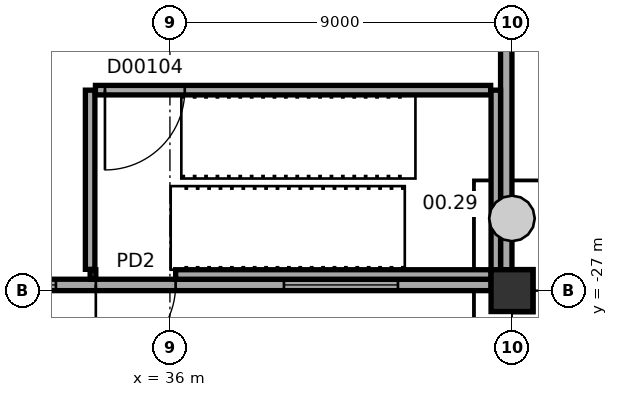
"""IFC4 building model, lengths in metres.
Left out: names, types, materials, properties, quantities, classifications, styles, units other than length and angle.
Written with IfcOpenShell. Run it as: python <this file> out.ifc"""

import sys

from ifc_helpers import new_model, si_unit, direction, frame, frame_2d, origin, origin_2d, place, context, subcontext, project, spatial, rectangle, extrude, element, fill, save


model = new_model("IFC4")
c1 = context("Model", 3, precision=1e-05, world=origin(), true_north=direction((0.0, 1.0)))
c2 = subcontext(c1, "Body", "Model", "MODEL_VIEW")
j1 = project(units=[si_unit("LENGTHUNIT", "METRE"), si_unit("PLANEANGLEUNIT", "RADIAN")], contexts=[c1])
p1 = place(None, origin())
s1 = spatial("IfcSite", under=j1, at=p1, CompositionType="ELEMENT")
p2 = place(p1, origin())
s2 = spatial("IfcBuilding", under=s1, at=p2, CompositionType="ELEMENT")
p3 = place(p2, origin())
s3 = spatial("IfcBuildingStorey", under=s2, at=p3, CompositionType="ELEMENT", Elevation=0.0)
p4 = place(p3, frame((45.0, -27.0, -0.3), z_axis=(0.0, 0.0, 1.0), x_axis=(1.0, 0.0, 0.0)))
e1 = element("IfcColumn", 1, at=p4, inside=s3, PredefinedType="COLUMN", context=c2, shape_type="SweptSolid", body=[
    extrude(rectangle(XDim=1.1, YDim=1.1, at=origin_2d()), origin(), (0.0, 0.0, 1.0), 7.8),
])
p5 = place(p3, frame((27.55, -26.85, 0.0), z_axis=(0.0, 0.0, 1.0), x_axis=(1.0, 0.0, 0.0)))
e2 = element("IfcWall", 2, at=p5, inside=s3, PredefinedType="STANDARD", context=c2, shape_type="SweptSolid", body=[
    extrude(rectangle(XDim=16.9, YDim=0.3, at=frame_2d((8.45, 0.0))), origin(), (0.0, 0.0, 1.0), 6.0),
])
p6 = place(p5, frame((2.45, 0.0, 4.7)))
e3 = element("IfcOpeningElement", 3, at=p6, cuts=e2, PredefinedType="OPENING", context=c2, shape_type="SweptSolid", body=[
    extrude(rectangle(XDim=3.0, YDim=1.3, at=frame_2d((1.5, 0.65))), frame((0.0, 0.16, 0.0), z_axis=(0.0, -1.0, 0.0), x_axis=(1.0, 0.0, 0.0)), (0.0, 0.0, 1.0), 0.32),
])
p7 = place(p5, frame((11.45, 0.0, 4.7)))
e4 = element("IfcOpeningElement", 4, at=p7, cuts=e2, PredefinedType="OPENING", context=c2, shape_type="SweptSolid", body=[
    extrude(rectangle(XDim=3.0, YDim=1.3, at=frame_2d((1.5, 0.65))), frame((0.0, 0.16, 0.0), z_axis=(0.0, -1.0, 0.0), x_axis=(1.0, 0.0, 0.0)), (0.0, 0.0, 1.0), 0.32),
])
p8 = place(p5, frame((2.5, 0.0, 0.0)))
e5 = element("IfcOpeningElement", 5, at=p8, cuts=e2, PredefinedType="OPENING", context=c2, shape_type="SweptSolid", body=[
    extrude(rectangle(XDim=1.3, YDim=2.4, at=frame_2d((0.65, 1.2))), frame((0.0, 0.16, 0.0), z_axis=(0.0, -1.0, 0.0), x_axis=(1.0, 0.0, 0.0)), (0.0, 0.0, 1.0), 0.32),
])
p9 = place(p5, frame((6.5, 0.0, 0.0)))
e6 = element("IfcOpeningElement", 6, at=p9, cuts=e2, PredefinedType="OPENING", context=c2, shape_type="SweptSolid", body=[
    extrude(rectangle(XDim=2.1, YDim=2.4, at=frame_2d((1.05, 1.2))), frame((0.0, 0.16, 0.0), z_axis=(0.0, -1.0, 0.0), x_axis=(1.0, 0.0, 0.0)), (0.0, 0.0, 1.0), 0.32),
])
p10 = place(p3, frame((44.85, -26.45, 0.0), z_axis=(0.0, 0.0, 1.0), x_axis=(0.0, 1.0, 0.0)))
e7 = element("IfcWall", 7, at=p10, inside=s3, PredefinedType="STANDARD", context=c2, shape_type="SweptSolid", body=[
    extrude(rectangle(XDim=16.9, YDim=0.3, at=frame_2d((8.45, 0.0))), origin(), (0.0, 0.0, 1.0), 6.0),
])
p11 = place(p10, frame((13.8, 0.0, 0.0)))
e8 = element("IfcOpeningElement", 8, at=p11, cuts=e7, PredefinedType="OPENING", context=c2, shape_type="SweptSolid", body=[
    extrude(rectangle(XDim=1.3, YDim=2.4, at=frame_2d((0.65, 1.2))), frame((0.0, 0.16, 0.0), z_axis=(0.0, -1.0, 0.0), x_axis=(1.0, 0.0, 0.0)), (0.0, 0.0, 1.0), 0.32),
])
p12 = place(p10, frame((10.3, 0.0, 0.0)))
e9 = element("IfcOpeningElement", 9, at=p12, cuts=e7, PredefinedType="OPENING", context=c2, shape_type="SweptSolid", body=[
    extrude(rectangle(XDim=1.3, YDim=2.4, at=frame_2d((0.65, 1.2))), frame((0.0, 0.16, 0.0), z_axis=(0.0, -1.0, 0.0), x_axis=(1.0, 0.0, 0.0)), (0.0, 0.0, 1.0), 0.32),
])
p13 = place(p10, frame((6.8, 0.0, 0.0)))
e10 = element("IfcOpeningElement", 10, at=p13, cuts=e7, PredefinedType="OPENING", context=c2, shape_type="SweptSolid", body=[
    extrude(rectangle(XDim=1.3, YDim=2.4, at=frame_2d((0.65, 1.2))), frame((0.0, 0.16, 0.0), z_axis=(0.0, -1.0, 0.0), x_axis=(1.0, 0.0, 0.0)), (0.0, 0.0, 1.0), 0.32),
])
p14 = place(p3, frame((33.9, -26.44, 0.0), z_axis=(0.0, 0.0, 1.0), x_axis=(0.0, 1.0, 0.0)))
e11 = element("IfcWall", 11, at=p14, inside=s3, PredefinedType="SOLIDWALL", context=c2, shape_type="SweptSolid", body=[
    extrude(rectangle(XDim=4.715, YDim=0.25, at=frame_2d((2.357, 0.0))), origin(), (0.0, 0.0, 1.0), 7.2),
])
p15 = place(p3, frame((34.04, -21.725, 0.0), z_axis=(0.0, 0.0, 1.0), x_axis=(1.0, 0.0, 0.0)))
e12 = element("IfcWall", 12, at=p15, inside=s3, PredefinedType="SOLIDWALL", context=c2, shape_type="SweptSolid", body=[
    extrude(rectangle(XDim=10.4, YDim=0.25, at=frame_2d((5.2, 0.0))), origin(), (0.0, 0.0, 1.0), 7.2),
])
p16 = place(p15, frame((0.25, 0.0, 0.0)))
e13 = element("IfcOpeningElement", 13, at=p16, cuts=e12, PredefinedType="OPENING", context=c2, shape_type="SweptSolid", body=[
    extrude(rectangle(XDim=2.1, YDim=2.4, at=frame_2d((1.05, 1.2))), frame((0.0, 0.135, 0.0), z_axis=(0.0, -1.0, 0.0), x_axis=(1.0, 0.0, 0.0)), (0.0, 0.0, 1.0), 0.27),
])
p17 = place(p3, frame((44.575, -21.725, 0.0), z_axis=(0.0, 0.0, 1.0), x_axis=(0.0, -1.0, 0.0)))
e14 = element("IfcWall", 14, at=p17, inside=s3, PredefinedType="SOLIDWALL", context=c2, shape_type="SweptSolid", body=[
    extrude(rectangle(XDim=4.975, YDim=0.25, at=frame_2d((2.487, 0.0))), origin(), (0.0, 0.0, 1.0), 7.2),
])
p18 = place(p3, frame((44.45, -26.575, 0.0), z_axis=(0.0, 0.0, 1.0), x_axis=(-1.0, 0.0, 0.0)))
e15 = element("IfcWall", 15, at=p18, inside=s3, PredefinedType="SOLIDWALL", context=c2, shape_type="SweptSolid", body=[
    extrude(rectangle(XDim=8.3, YDim=0.25, at=frame_2d((4.15, 0.0))), origin(), (0.0, 0.0, 1.0), 7.2),
])
p19 = place(p3, frame((34.05, -26.575, 0.0), z_axis=(0.0, 0.0, 1.0), x_axis=(-1.0, 0.0, 0.0)))
e16 = element("IfcWall", 16, at=p19, inside=s3, PredefinedType="SOLIDWALL", context=c2, shape_type="SweptSolid", body=[
    extrude(rectangle(XDim=0.15, YDim=0.25, at=frame_2d((0.075, 0.0))), origin(), (0.0, 0.0, 1.0), 7.2),
])
p20 = place(p6, origin())
e17 = element("IfcWindow", 17, at=p20, inside=s3, PartitioningType="SINGLE_PANEL", PredefinedType="WINDOW", context=c2, shape_type="SweptSolid", body=[
    extrude(rectangle(XDim=3.0, YDim=1.3, at=frame_2d((1.5, 0.65))), frame((0.0, 0.03, 0.0), z_axis=(0.0, -1.0, 0.0), x_axis=(1.0, 0.0, 0.0)), (0.0, 0.0, 1.0), 0.06),
])
fill(e3, e17)
p21 = place(p7, origin())
e18 = element("IfcWindow", 18, at=p21, inside=s3, PartitioningType="SINGLE_PANEL", PredefinedType="WINDOW", context=c2, shape_type="SweptSolid", body=[
    extrude(rectangle(XDim=3.0, YDim=1.3, at=frame_2d((1.5, 0.65))), frame((0.0, 0.03, 0.0), z_axis=(0.0, -1.0, 0.0), x_axis=(1.0, 0.0, 0.0)), (0.0, 0.0, 1.0), 0.06),
])
fill(e4, e18)
p22 = place(p16, frame((2.1, 0.0, 0.0), z_axis=(0.0, 0.0, 1.0), x_axis=(-1.0, 0.0, 0.0)))
e19 = element("IfcDoor", 19, at=p22, inside=s3, OperationType="DOUBLE_DOOR_SINGLE_SWING", PredefinedType="DOOR", context=c2, shape_type="SweptSolid", body=[
    extrude(rectangle(XDim=2.1, YDim=2.4, at=frame_2d((1.05, 1.2))), frame((0.0, 0.025, 0.0), z_axis=(0.0, -1.0, 0.0), x_axis=(1.0, 0.0, 0.0)), (0.0, 0.0, 1.0), 0.05),
])
fill(e13, e19)
p23 = place(p9, frame((2.1, 0.0, 0.0), z_axis=(0.0, 0.0, 1.0), x_axis=(-1.0, 0.0, 0.0)))
e20 = element("IfcDoor", 20, at=p23, inside=s3, OperationType="DOUBLE_DOOR_SINGLE_SWING", PredefinedType="DOOR", context=c2, shape_type="SweptSolid", body=[
    extrude(rectangle(XDim=2.1, YDim=2.4, at=frame_2d((1.05, 1.2))), frame((0.0, 0.025, 0.0), z_axis=(0.0, -1.0, 0.0), x_axis=(1.0, 0.0, 0.0)), (0.0, 0.0, 1.0), 0.05),
])
fill(e6, e20)
save(model, sys.argv[1])
